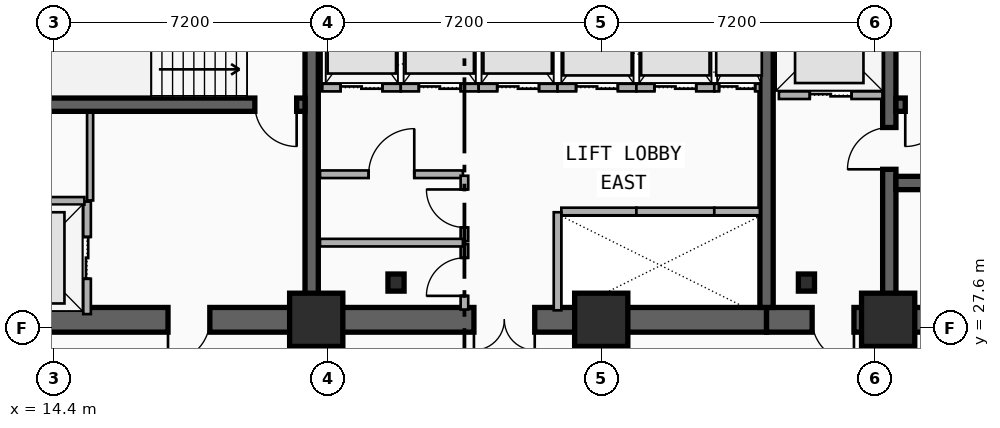
"""IFC4 building model, lengths in metres.
Left out: names, types, materials, properties, quantities, classifications, styles, units other than length and angle.
Written with IfcOpenShell. Run it as: python <this file> out.ifc"""

import sys

from ifc_helpers import new_model, si_unit, direction, frame, frame_2d, origin, origin_2d, place, context, subcontext, project, spatial, rectangle, i_section, extrude, element, fill, save


model = new_model("IFC4")
c1 = context("Model", 3, precision=1e-05, world=origin(), true_north=direction((0.0, 1.0)))
c2 = subcontext(c1, "Body", "Model", "MODEL_VIEW")
j1 = project(units=[si_unit("LENGTHUNIT", "METRE"), si_unit("PLANEANGLEUNIT", "RADIAN")], contexts=[c1])
p1 = place(None, origin())
s1 = spatial("IfcSite", under=j1, at=p1, CompositionType="ELEMENT")
p2 = place(p1, origin())
s2 = spatial("IfcBuilding", under=s1, at=p2, CompositionType="ELEMENT")
p3 = place(p2, frame((0.0, 0.0, 82.8)))
s3 = spatial("IfcBuildingStorey", under=s2, at=p3, CompositionType="ELEMENT", Elevation=82.8)
p4 = place(p3, frame((21.18, 27.82, 0.0), z_axis=(0.0, 0.0, 1.0), x_axis=(-1.0, 0.0, 0.0)))
e1 = element("IfcWall", 1, at=p4, inside=s3, PredefinedType="SHEAR", context=c2, shape_type="SweptSolid", body=[
    extrude(rectangle(XDim=9.03, YDim=0.65, at=frame_2d((4.515, 0.0))), origin(), (0.0, 0.0, 1.0), 3.5),
])
p5 = place(p4, frame((2.68, 0.0, 0.0)))
e2 = element("IfcOpeningElement", 2, at=p5, cuts=e1, PredefinedType="OPENING", context=c2, shape_type="SweptSolid", body=[
    extrude(rectangle(XDim=1.1, YDim=2.15, at=frame_2d((0.55, 1.075))), frame((0.0, 0.335, 0.0), z_axis=(0.0, -1.0, 0.0), x_axis=(1.0, 0.0, 0.0)), (0.0, 0.0, 1.0), 0.67),
])
p6 = place(p3, frame((33.15, 27.82, 0.0), z_axis=(0.0, 0.0, 1.0), x_axis=(-1.0, 0.0, 0.0)))
e3 = element("IfcWall", 3, at=p6, inside=s3, PredefinedType="SHEAR", context=c2, shape_type="SweptSolid", body=[
    extrude(rectangle(XDim=11.97, YDim=0.65, at=frame_2d((5.985, 0.0))), origin(), (0.0, 0.0, 1.0), 3.5),
])
p7 = place(p6, frame((6.1, 0.0, 0.0)))
e4 = element("IfcOpeningElement", 4, at=p7, cuts=e3, PredefinedType="OPENING", context=c2, shape_type="SweptSolid", body=[
    extrude(rectangle(XDim=1.6, YDim=2.2, at=frame_2d((0.8, 1.1))), frame((0.0, 0.335, 0.0), z_axis=(0.0, -1.0, 0.0), x_axis=(1.0, 0.0, 0.0)), (0.0, 0.0, 1.0), 0.67),
])
p8 = place(p3, frame((45.38, 27.82, 0.0), z_axis=(0.0, 0.0, 1.0), x_axis=(-1.0, 0.0, 0.0)))
e5 = element("IfcWall", 5, at=p8, inside=s3, PredefinedType="SHEAR", context=c2, shape_type="SweptSolid", body=[
    extrude(rectangle(XDim=12.23, YDim=0.65, at=frame_2d((6.115, 0.0))), origin(), (0.0, 0.0, 1.0), 3.5),
])
p9 = place(p8, frame((9.93, 0.0, 0.0)))
e6 = element("IfcOpeningElement", 6, at=p9, cuts=e5, PredefinedType="OPENING", context=c2, shape_type="SweptSolid", body=[
    extrude(rectangle(XDim=1.1, YDim=2.15, at=frame_2d((0.55, 1.075))), frame((0.0, 0.335, 0.0), z_axis=(0.0, -1.0, 0.0), x_axis=(1.0, 0.0, 0.0)), (0.0, 0.0, 1.0), 0.67),
])
p10 = place(p8, frame((6.23, 0.0, 0.0)))
e7 = element("IfcOpeningElement", 7, at=p10, cuts=e5, PredefinedType="OPENING", context=c2, shape_type="SweptSolid", body=[
    extrude(rectangle(XDim=1.1, YDim=2.15, at=frame_2d((0.55, 1.075))), frame((0.0, 0.335, 0.0), z_axis=(0.0, -1.0, 0.0), x_axis=(1.0, 0.0, 0.0)), (0.0, 0.0, 1.0), 0.67),
])
for number, where, z_axis, x_axis in (
    (8, (21.18, 28.145, 0.0), (0.0, 0.0, 1.0), (0.0, 1.0, 0.0)),
    (9, (33.15, 28.145, 0.0), (0.0, 0.0, 1.0), (0.0, 1.0, 0.0)),
):
    element("IfcWall", number, at=place(p3, frame(where, z_axis=z_axis, x_axis=x_axis)), inside=s3, PredefinedType="SHEAR", context=c2, shape_type="SweptSolid", body=[
        extrude(rectangle(XDim=8.58, YDim=0.35, at=frame_2d((4.29, 0.0))), origin(), (0.0, 0.0, 1.0), 3.5),
    ])
p11 = place(p3, frame((36.38, 28.145, 0.0), z_axis=(0.0, 0.0, 1.0), x_axis=(0.0, 1.0, 0.0)))
e10 = element("IfcWall", 10, at=p11, inside=s3, PredefinedType="SHEAR", context=c2, shape_type="SweptSolid", body=[
    extrude(rectangle(XDim=8.58, YDim=0.35, at=frame_2d((4.29, 0.0))), origin(), (0.0, 0.0, 1.0), 3.5),
])
p12 = place(p11, frame((3.635, 0.0, 0.0)))
e11 = element("IfcOpeningElement", 11, at=p12, cuts=e10, PredefinedType="OPENING", context=c2, shape_type="SweptSolid", body=[
    extrude(rectangle(XDim=1.1, YDim=2.15, at=frame_2d((0.55, 1.075))), frame((0.0, 0.185, 0.0), z_axis=(0.0, -1.0, 0.0), x_axis=(1.0, 0.0, 0.0)), (0.0, 0.0, 1.0), 0.37),
])
p13 = place(p3, frame((21.005, 33.48, 0.0), z_axis=(0.0, 0.0, 1.0), x_axis=(-1.0, 0.0, 0.0)))
e12 = element("IfcWall", 12, at=p13, inside=s3, PredefinedType="SHEAR", context=c2, shape_type="SweptSolid", body=[
    extrude(rectangle(XDim=8.53, YDim=0.35, at=frame_2d((4.265, 0.0))), origin(), (0.0, 0.0, 1.0), 3.5),
])
p14 = place(p13, frame((0.22, 0.0, 0.0)))
e13 = element("IfcOpeningElement", 13, at=p14, cuts=e12, PredefinedType="OPENING", context=c2, shape_type="SweptSolid", body=[
    extrude(rectangle(XDim=1.1, YDim=2.15, at=frame_2d((0.55, 1.075))), frame((0.0, 0.185, 0.0), z_axis=(0.0, -1.0, 0.0), x_axis=(1.0, 0.0, 0.0)), (0.0, 0.0, 1.0), 0.37),
])
p15 = place(p3, frame((45.055, 33.48, 0.0), z_axis=(0.0, 0.0, 1.0), x_axis=(-1.0, 0.0, 0.0)))
e14 = element("IfcWall", 14, at=p15, inside=s3, PredefinedType="SHEAR", context=c2, shape_type="SweptSolid", body=[
    extrude(rectangle(XDim=8.5, YDim=0.35, at=frame_2d((4.25, 0.0))), origin(), (0.0, 0.0, 1.0), 3.5),
])
p16 = place(p15, frame((7.155, 0.0, 0.0)))
e15 = element("IfcOpeningElement", 15, at=p16, cuts=e14, PredefinedType="OPENING", context=c2, shape_type="SweptSolid", body=[
    extrude(rectangle(XDim=1.1, YDim=2.15, at=frame_2d((0.55, 1.075))), frame((0.0, 0.185, 0.0), z_axis=(0.0, -1.0, 0.0), x_axis=(1.0, 0.0, 0.0)), (0.0, 0.0, 1.0), 0.37),
])
p17 = place(p3, frame((36.555, 31.42, 0.0), z_axis=(0.0, 0.0, 1.0), x_axis=(1.0, 0.0, 0.0)))
e16 = element("IfcWall", 16, at=p17, inside=s3, PredefinedType="SHEAR", context=c2, shape_type="SweptSolid", body=[
    extrude(rectangle(XDim=8.5, YDim=0.35, at=frame_2d((4.25, 0.0))), origin(), (0.0, 0.0, 1.0), 3.5),
])
for number, where, z_axis, x_axis in (
    (17, (23.4, 28.8, 0.0), (0.0, 0.0, 1.0), (1.0, 0.0, 0.0)),
    (18, (34.2, 28.8, 0.0), (0.0, 0.0, 1.0), (1.0, 0.0, 0.0)),
):
    element("IfcColumn", number, at=place(p3, frame(where, z_axis=z_axis, x_axis=x_axis)), inside=s3, PredefinedType="COLUMN", context=c2, shape_type="SweptSolid", body=[
        extrude(i_section(OverallWidth=0.424, OverallDepth=0.45, WebThickness=0.041, FlangeThickness=0.065, FilletRadius=0.015, at=origin_2d()), origin(), (0.0, 0.0, 1.0), 3.5),
    ])
for number, where, z_axis, x_axis in (
    (19, (21.3, 27.82, 0.0), (0.0, 0.0, 1.0), (1.0, 0.0, 0.0)),
    (20, (28.8, 27.82, 0.0), (0.0, 0.0, 1.0), (1.0, 0.0, 0.0)),
    (21, (36.35, 27.82, 0.0), (0.0, 0.0, 1.0), (1.0, 0.0, 0.0)),
):
    element("IfcColumn", number, at=place(p3, frame(where, z_axis=z_axis, x_axis=x_axis)), inside=s3, PredefinedType="COLUMN", context=c2, shape_type="SweptSolid", body=[
        extrude(rectangle(XDim=1.4, YDim=1.4, at=origin_2d()), origin(), (0.0, 0.0, 1.0), 3.5),
    ])
p18 = place(p3, frame((15.27, 27.97, 0.0), z_axis=(0.0, 0.0, 1.0), x_axis=(0.0, 1.0, 0.0)))
e22 = element("IfcWall", 22, at=p18, inside=s3, PredefinedType="PARTITIONING", context=c2, shape_type="SweptSolid", body=[
    extrude(rectangle(XDim=2.96, YDim=0.2, at=frame_2d((1.48, 0.0))), origin(), (0.0, 0.0, 1.0), 2.212),
])
p19 = place(p18, frame((0.93, 0.0, 0.0)))
e23 = element("IfcOpeningElement", 23, at=p19, cuts=e22, PredefinedType="OPENING", context=c2, shape_type="SweptSolid", body=[
    extrude(rectangle(XDim=1.1, YDim=2.15, at=frame_2d((0.55, 1.075))), frame((0.0, 0.11, 0.0), z_axis=(0.0, -1.0, 0.0), x_axis=(1.0, 0.0, 0.0)), (0.0, 0.0, 1.0), 0.22),
])
p20 = place(p3, frame((12.45, 30.95, 0.0), z_axis=(0.0, 0.0, 1.0), x_axis=(1.0, 0.0, 0.0)))
e24 = element("IfcWall", 24, at=p20, inside=s3, PredefinedType="PARTITIONING", context=c2, shape_type="SweptSolid", body=[
    extrude(rectangle(XDim=2.75, YDim=0.2, at=frame_2d((1.375, 0.0))), origin(), (0.0, 0.0, 1.0), 2.212),
])
p21 = place(p3, frame((33.475, 33.73, 0.0), z_axis=(0.0, 0.0, 1.0), x_axis=(1.0, 0.0, 0.0)))
e25 = element("IfcWall", 25, at=p21, inside=s3, PredefinedType="PARTITIONING", context=c2, shape_type="SweptSolid", body=[
    extrude(rectangle(XDim=2.725, YDim=0.2, at=frame_2d((1.362, 0.0))), origin(), (0.0, 0.0, 1.0), 2.212),
])
p22 = place(p21, frame((0.812, 0.0, 0.0)))
e26 = element("IfcOpeningElement", 26, at=p22, cuts=e25, PredefinedType="OPENING", context=c2, shape_type="SweptSolid", body=[
    extrude(rectangle(XDim=1.1, YDim=2.15, at=frame_2d((0.55, 1.075))), frame((0.0, 0.11, 0.0), z_axis=(0.0, -1.0, 0.0), x_axis=(1.0, 0.0, 0.0)), (0.0, 0.0, 1.0), 0.22),
])
p23 = place(p3, frame((27.75, 30.67, 0.0), z_axis=(0.0, 0.0, 1.0), x_axis=(1.0, 0.0, 0.0)))
e27 = element("IfcWall", 27, at=p23, inside=s3, PredefinedType="PARTITIONING", context=c2, shape_type="SweptSolid", body=[
    extrude(rectangle(XDim=1.975, YDim=0.2, at=frame_2d((0.988, 0.0))), origin(), (0.0, 0.0, 1.0), 2.212),
])
p24 = place(p3, frame((27.65, 28.07, 0.0), z_axis=(0.0, 0.0, 1.0), x_axis=(0.0, 1.0, 0.0)))
e28 = element("IfcWall", 28, at=p24, inside=s3, PredefinedType="PARTITIONING", context=c2, shape_type="SweptSolid", body=[
    extrude(rectangle(XDim=2.58, YDim=0.2, at=frame_2d((1.29, 0.0))), origin(), (0.0, 0.0, 1.0), 2.212),
])
p25 = place(p3, frame((29.725, 30.67, 0.0), z_axis=(0.0, 0.0, 1.0), x_axis=(1.0, 0.0, 0.0)))
e29 = element("IfcWall", 29, at=p25, inside=s3, PredefinedType="PARTITIONING", context=c2, shape_type="SweptSolid", body=[
    extrude(rectangle(XDim=2.05, YDim=0.2, at=frame_2d((1.025, 0.0))), origin(), (0.0, 0.0, 1.0), 2.62),
])
p26 = place(p3, frame((31.775, 30.67, 0.0), z_axis=(0.0, 0.0, 1.0), x_axis=(1.0, 0.0, 0.0)))
e30 = element("IfcWall", 30, at=p26, inside=s3, PredefinedType="PARTITIONING", context=c2, shape_type="SweptSolid", body=[
    extrude(rectangle(XDim=1.2, YDim=0.2, at=frame_2d((0.6, 0.0))), origin(), (0.0, 0.0, 1.0), 2.62),
])
p27 = place(p3, frame((21.46, 33.93, 0.0), z_axis=(0.0, 0.0, 1.0), x_axis=(1.0, 0.0, 0.0)))
e31 = element("IfcWall", 31, at=p27, inside=s3, PredefinedType="PARTITIONING", context=c2, shape_type="SweptSolid", body=[
    extrude(rectangle(XDim=2.065, YDim=0.2, at=frame_2d((1.032, 0.0))), origin(), (0.0, 0.0, 1.0), 2.212),
])
p28 = place(p27, frame((0.482, 0.0, 0.0)))
e32 = element("IfcOpeningElement", 32, at=p28, cuts=e31, PredefinedType="OPENING", context=c2, shape_type="SweptSolid", body=[
    extrude(rectangle(XDim=1.1, YDim=2.15, at=frame_2d((0.55, 1.075))), frame((0.0, 0.11, 0.0), z_axis=(0.0, -1.0, 0.0), x_axis=(1.0, 0.0, 0.0)), (0.0, 0.0, 1.0), 0.22),
])
p29 = place(p3, frame((23.525, 33.93, 0.0), z_axis=(0.0, 0.0, 1.0), x_axis=(1.0, 0.0, 0.0)))
e33 = element("IfcWall", 33, at=p29, inside=s3, PredefinedType="PARTITIONING", context=c2, shape_type="SweptSolid", body=[
    extrude(rectangle(XDim=2.05, YDim=0.2, at=frame_2d((1.025, 0.0))), origin(), (0.0, 0.0, 1.0), 3.24),
])
p30 = place(p29, frame((0.475, 0.0, 0.0)))
e34 = element("IfcOpeningElement", 34, at=p30, cuts=e33, PredefinedType="OPENING", context=c2, shape_type="SweptSolid", body=[
    extrude(rectangle(XDim=1.1, YDim=2.15, at=frame_2d((0.55, 1.075))), frame((0.0, 0.11, 0.0), z_axis=(0.0, -1.0, 0.0), x_axis=(1.0, 0.0, 0.0)), (0.0, 0.0, 1.0), 0.22),
])
p31 = place(p3, frame((25.575, 33.93, 0.0), z_axis=(0.0, 0.0, 1.0), x_axis=(1.0, 0.0, 0.0)))
e35 = element("IfcWall", 35, at=p31, inside=s3, PredefinedType="PARTITIONING", context=c2, shape_type="SweptSolid", body=[
    extrude(rectangle(XDim=2.075, YDim=0.2, at=frame_2d((1.038, 0.0))), origin(), (0.0, 0.0, 1.0), 3.24),
])
p32 = place(p31, frame((0.488, 0.0, 0.0)))
e36 = element("IfcOpeningElement", 36, at=p32, cuts=e35, PredefinedType="OPENING", context=c2, shape_type="SweptSolid", body=[
    extrude(rectangle(XDim=1.1, YDim=2.15, at=frame_2d((0.55, 1.075))), frame((0.0, 0.11, 0.0), z_axis=(0.0, -1.0, 0.0), x_axis=(1.0, 0.0, 0.0)), (0.0, 0.0, 1.0), 0.22),
])
p33 = place(p3, frame((27.65, 33.93, 0.0), z_axis=(0.0, 0.0, 1.0), x_axis=(1.0, 0.0, 0.0)))
e37 = element("IfcWall", 37, at=p33, inside=s3, PredefinedType="PARTITIONING", context=c2, shape_type="SweptSolid", body=[
    extrude(rectangle(XDim=2.075, YDim=0.2, at=frame_2d((1.038, 0.0))), origin(), (0.0, 0.0, 1.0), 2.212),
])
p34 = place(p33, frame((0.488, 0.0, 0.0)))
e38 = element("IfcOpeningElement", 38, at=p34, cuts=e37, PredefinedType="OPENING", context=c2, shape_type="SweptSolid", body=[
    extrude(rectangle(XDim=1.1, YDim=2.15, at=frame_2d((0.55, 1.075))), frame((0.0, 0.11, 0.0), z_axis=(0.0, -1.0, 0.0), x_axis=(1.0, 0.0, 0.0)), (0.0, 0.0, 1.0), 0.22),
])
p35 = place(p3, frame((29.725, 33.93, 0.0), z_axis=(0.0, 0.0, 1.0), x_axis=(1.0, 0.0, 0.0)))
e39 = element("IfcWall", 39, at=p35, inside=s3, PredefinedType="PARTITIONING", context=c2, shape_type="SweptSolid", body=[
    extrude(rectangle(XDim=2.05, YDim=0.2, at=frame_2d((1.025, 0.0))), origin(), (0.0, 0.0, 1.0), 3.24),
])
p36 = place(p35, frame((0.475, 0.0, 0.0)))
e40 = element("IfcOpeningElement", 40, at=p36, cuts=e39, PredefinedType="OPENING", context=c2, shape_type="SweptSolid", body=[
    extrude(rectangle(XDim=1.1, YDim=2.15, at=frame_2d((0.55, 1.075))), frame((0.0, 0.11, 0.0), z_axis=(0.0, -1.0, 0.0), x_axis=(1.0, 0.0, 0.0)), (0.0, 0.0, 1.0), 0.22),
])
p37 = place(p3, frame((31.775, 33.93, 0.0), z_axis=(0.0, 0.0, 1.0), x_axis=(1.0, 0.0, 0.0)))
e41 = element("IfcWall", 41, at=p37, inside=s3, PredefinedType="PARTITIONING", context=c2, shape_type="SweptSolid", body=[
    extrude(rectangle(XDim=1.2, YDim=0.2, at=frame_2d((0.6, 0.0))), origin(), (0.0, 0.0, 1.0), 3.24),
])
p38 = place(p37, frame((0.125, 0.0, 0.0)))
e42 = element("IfcOpeningElement", 42, at=p38, cuts=e41, PredefinedType="OPENING", context=c2, shape_type="SweptSolid", body=[
    extrude(rectangle(XDim=0.95, YDim=2.15, at=frame_2d((0.475, 1.075))), frame((0.0, 0.11, 0.0), z_axis=(0.0, -1.0, 0.0), x_axis=(1.0, 0.0, 0.0)), (0.0, 0.0, 1.0), 0.22),
])
p39 = place(p3, frame((21.4, 31.65, 0.0), z_axis=(0.0, 0.0, 1.0), x_axis=(1.0, 0.0, 0.0)))
e43 = element("IfcWall", 43, at=p39, inside=s3, PredefinedType="PARTITIONING", context=c2, shape_type="SweptSolid", body=[
    extrude(rectangle(XDim=3.76, YDim=0.2, at=frame_2d((1.88, 0.0))), origin(), (0.0, 0.0, 1.0), 2.28),
])
p40 = place(p39, frame((1.28, 0.0, 0.0)))
e44 = element("IfcOpeningElement", 44, at=p40, cuts=e43, PredefinedType="OPENING", context=c2, shape_type="SweptSolid", body=[
    extrude(rectangle(XDim=1.2, YDim=2.15, at=frame_2d((0.6, 1.075))), frame((0.0, 0.11, 0.0), z_axis=(0.0, -1.0, 0.0), x_axis=(1.0, 0.0, 0.0)), (0.0, 0.0, 1.0), 0.22),
])
p41 = place(p3, frame((25.2, 28.09, 0.0), z_axis=(0.0, 0.0, 1.0), x_axis=(0.0, 1.0, 0.0)))
e45 = element("IfcWall", 45, at=p41, inside=s3, PredefinedType="PARTITIONING", context=c2, shape_type="SweptSolid", body=[
    extrude(rectangle(XDim=1.72, YDim=0.2, at=frame_2d((0.86, 0.0))), origin(), (0.0, 0.0, 1.0), 2.62),
])
p42 = place(p41, frame((0.36, 0.0, 0.0)))
e46 = element("IfcOpeningElement", 46, at=p42, cuts=e45, PredefinedType="OPENING", context=c2, shape_type="SweptSolid", body=[
    extrude(rectangle(XDim=1.0, YDim=2.15, at=frame_2d((0.5, 1.075))), frame((0.0, 0.11, 0.0), z_axis=(0.0, -1.0, 0.0), x_axis=(1.0, 0.0, 0.0)), (0.0, 0.0, 1.0), 0.22),
])
p43 = place(p3, frame((25.2, 29.89, 0.0), z_axis=(0.0, 0.0, 1.0), x_axis=(0.0, 1.0, 0.0)))
e47 = element("IfcWall", 47, at=p43, inside=s3, PredefinedType="PARTITIONING", context=c2, shape_type="SweptSolid", body=[
    extrude(rectangle(XDim=1.72, YDim=0.2, at=frame_2d((0.86, 0.0))), origin(), (0.0, 0.0, 1.0), 3.24),
])
p44 = place(p43, frame((0.36, 0.0, 0.0)))
e48 = element("IfcOpeningElement", 48, at=p44, cuts=e47, PredefinedType="OPENING", context=c2, shape_type="SweptSolid", body=[
    extrude(rectangle(XDim=1.0, YDim=2.15, at=frame_2d((0.5, 1.075))), frame((0.0, 0.11, 0.0), z_axis=(0.0, -1.0, 0.0), x_axis=(1.0, 0.0, 0.0)), (0.0, 0.0, 1.0), 0.22),
])
p45 = place(p3, frame((21.4, 29.85, 0.0), z_axis=(0.0, 0.0, 1.0), x_axis=(1.0, 0.0, 0.0)))
e49 = element("IfcWall", 49, at=p45, inside=s3, PredefinedType="PARTITIONING", context=c2, shape_type="SweptSolid", body=[
    extrude(rectangle(XDim=3.76, YDim=0.2, at=frame_2d((1.88, 0.0))), origin(), (0.0, 0.0, 1.0), 2.28),
])
p46 = place(p3, frame((15.35, 30.96, 0.0), z_axis=(0.0, 0.0, 1.0), x_axis=(0.0, 1.0, 0.0)))
e50 = element("IfcWall", 50, at=p46, inside=s3, PredefinedType="PARTITIONING", context=c2, shape_type="SweptSolid", body=[
    extrude(rectangle(XDim=2.31, YDim=0.16, at=frame_2d((1.155, 0.0))), origin(), (0.0, 0.0, 1.0), 3.24),
])
p47 = place(p19, origin())
e51 = element("IfcDoor", 51, at=p47, inside=s3, OperationType="DOUBLE_DOOR_SLIDING", PredefinedType="DOOR", context=c2, shape_type="SweptSolid", body=[
    extrude(rectangle(XDim=1.1, YDim=2.15, at=frame_2d((0.55, 1.075))), frame((0.0, 0.025, 0.0), z_axis=(0.0, -1.0, 0.0), x_axis=(1.0, 0.0, 0.0)), (0.0, 0.0, 1.0), 0.05),
])
fill(e23, e51)
p48 = place(p22, origin())
e52 = element("IfcDoor", 52, at=p48, inside=s3, OperationType="DOUBLE_DOOR_SLIDING", PredefinedType="DOOR", context=c2, shape_type="SweptSolid", body=[
    extrude(rectangle(XDim=1.1, YDim=2.15, at=frame_2d((0.55, 1.075))), frame((0.0, 0.025, 0.0), z_axis=(0.0, -1.0, 0.0), x_axis=(1.0, 0.0, 0.0)), (0.0, 0.0, 1.0), 0.05),
])
fill(e26, e52)
p49 = place(p28, origin())
e53 = element("IfcDoor", 53, at=p49, inside=s3, OperationType="DOUBLE_DOOR_SLIDING", PredefinedType="DOOR", context=c2, shape_type="SweptSolid", body=[
    extrude(rectangle(XDim=1.1, YDim=2.15, at=frame_2d((0.55, 1.075))), frame((0.0, 0.025, 0.0), z_axis=(0.0, -1.0, 0.0), x_axis=(1.0, 0.0, 0.0)), (0.0, 0.0, 1.0), 0.05),
])
fill(e32, e53)
p50 = place(p30, origin())
e54 = element("IfcDoor", 54, at=p50, inside=s3, OperationType="DOUBLE_DOOR_SLIDING", PredefinedType="DOOR", context=c2, shape_type="SweptSolid", body=[
    extrude(rectangle(XDim=1.1, YDim=2.15, at=frame_2d((0.55, 1.075))), frame((0.0, 0.025, 0.0), z_axis=(0.0, -1.0, 0.0), x_axis=(1.0, 0.0, 0.0)), (0.0, 0.0, 1.0), 0.05),
])
fill(e34, e54)
p51 = place(p32, origin())
e55 = element("IfcDoor", 55, at=p51, inside=s3, OperationType="DOUBLE_DOOR_SLIDING", PredefinedType="DOOR", context=c2, shape_type="SweptSolid", body=[
    extrude(rectangle(XDim=1.1, YDim=2.15, at=frame_2d((0.55, 1.075))), frame((0.0, 0.025, 0.0), z_axis=(0.0, -1.0, 0.0), x_axis=(1.0, 0.0, 0.0)), (0.0, 0.0, 1.0), 0.05),
])
fill(e36, e55)
p52 = place(p34, origin())
e56 = element("IfcDoor", 56, at=p52, inside=s3, OperationType="DOUBLE_DOOR_SLIDING", PredefinedType="DOOR", context=c2, shape_type="SweptSolid", body=[
    extrude(rectangle(XDim=1.1, YDim=2.15, at=frame_2d((0.55, 1.075))), frame((0.0, 0.025, 0.0), z_axis=(0.0, -1.0, 0.0), x_axis=(1.0, 0.0, 0.0)), (0.0, 0.0, 1.0), 0.05),
])
fill(e38, e56)
p53 = place(p36, origin())
e57 = element("IfcDoor", 57, at=p53, inside=s3, OperationType="DOUBLE_DOOR_SLIDING", PredefinedType="DOOR", context=c2, shape_type="SweptSolid", body=[
    extrude(rectangle(XDim=1.1, YDim=2.15, at=frame_2d((0.55, 1.075))), frame((0.0, 0.025, 0.0), z_axis=(0.0, -1.0, 0.0), x_axis=(1.0, 0.0, 0.0)), (0.0, 0.0, 1.0), 0.05),
])
fill(e40, e57)
p54 = place(p38, origin())
e58 = element("IfcDoor", 58, at=p54, inside=s3, OperationType="DOUBLE_DOOR_SLIDING", PredefinedType="DOOR", context=c2, shape_type="SweptSolid", body=[
    extrude(rectangle(XDim=0.95, YDim=2.15, at=frame_2d((0.475, 1.075))), frame((0.0, 0.025, 0.0), z_axis=(0.0, -1.0, 0.0), x_axis=(1.0, 0.0, 0.0)), (0.0, 0.0, 1.0), 0.05),
])
fill(e42, e58)
p55 = place(p14, origin())
e59 = element("IfcDoor", 59, at=p55, inside=s3, OperationType="SINGLE_SWING_LEFT", PredefinedType="DOOR", context=c2, shape_type="SweptSolid", body=[
    extrude(rectangle(XDim=1.1, YDim=2.15, at=frame_2d((0.55, 1.075))), frame((0.0, 0.025, 0.0), z_axis=(0.0, -1.0, 0.0), x_axis=(1.0, 0.0, 0.0)), (0.0, 0.0, 1.0), 0.05),
])
fill(e13, e59)
p56 = place(p5, origin())
e60 = element("IfcDoor", 60, at=p56, inside=s3, OperationType="SINGLE_SWING_RIGHT", PredefinedType="DOOR", context=c2, shape_type="SweptSolid", body=[
    extrude(rectangle(XDim=1.1, YDim=2.15, at=frame_2d((0.55, 1.075))), frame((0.0, 0.025, 0.0), z_axis=(0.0, -1.0, 0.0), x_axis=(1.0, 0.0, 0.0)), (0.0, 0.0, 1.0), 0.05),
])
fill(e2, e60)
p57 = place(p16, origin())
e61 = element("IfcDoor", 61, at=p57, inside=s3, OperationType="SINGLE_SWING_RIGHT", PredefinedType="DOOR", context=c2, shape_type="SweptSolid", body=[
    extrude(rectangle(XDim=1.1, YDim=2.15, at=frame_2d((0.55, 1.075))), frame((0.0, 0.025, 0.0), z_axis=(0.0, -1.0, 0.0), x_axis=(1.0, 0.0, 0.0)), (0.0, 0.0, 1.0), 0.05),
])
fill(e15, e61)
p58 = place(p12, origin())
e62 = element("IfcDoor", 62, at=p58, inside=s3, OperationType="SINGLE_SWING_LEFT", PredefinedType="DOOR", context=c2, shape_type="SweptSolid", body=[
    extrude(rectangle(XDim=1.1, YDim=2.15, at=frame_2d((0.55, 1.075))), frame((0.0, 0.025, 0.0), z_axis=(0.0, -1.0, 0.0), x_axis=(1.0, 0.0, 0.0)), (0.0, 0.0, 1.0), 0.05),
])
fill(e11, e62)
p59 = place(p9, origin())
e63 = element("IfcDoor", 63, at=p59, inside=s3, OperationType="SINGLE_SWING_LEFT", PredefinedType="DOOR", context=c2, shape_type="SweptSolid", body=[
    extrude(rectangle(XDim=1.1, YDim=2.15, at=frame_2d((0.55, 1.075))), frame((0.0, 0.025, 0.0), z_axis=(0.0, -1.0, 0.0), x_axis=(1.0, 0.0, 0.0)), (0.0, 0.0, 1.0), 0.05),
])
fill(e6, e63)
p60 = place(p7, origin())
e64 = element("IfcDoor", 64, at=p60, inside=s3, OperationType="SINGLE_SWING_LEFT", PredefinedType="DOOR", context=c2, shape_type="SweptSolid", body=[
    extrude(rectangle(XDim=1.6, YDim=2.2, at=frame_2d((0.8, 1.1))), frame((0.0, 0.025, 0.0), z_axis=(0.0, -1.0, 0.0), x_axis=(1.0, 0.0, 0.0)), (0.0, 0.0, 1.0), 0.05),
])
fill(e4, e64)
p61 = place(p40, origin())
e65 = element("IfcDoor", 65, at=p61, inside=s3, OperationType="SINGLE_SWING_RIGHT", PredefinedType="DOOR", context=c2, shape_type="SweptSolid", body=[
    extrude(rectangle(XDim=1.2, YDim=2.15, at=frame_2d((0.6, 1.075))), frame((0.0, 0.025, 0.0), z_axis=(0.0, -1.0, 0.0), x_axis=(1.0, 0.0, 0.0)), (0.0, 0.0, 1.0), 0.05),
])
fill(e44, e65)
p62 = place(p42, origin())
e66 = element("IfcDoor", 66, at=p62, inside=s3, OperationType="SINGLE_SWING_LEFT", PredefinedType="DOOR", context=c2, shape_type="SweptSolid", body=[
    extrude(rectangle(XDim=1.0, YDim=2.15, at=frame_2d((0.5, 1.075))), frame((0.0, 0.025, 0.0), z_axis=(0.0, -1.0, 0.0), x_axis=(1.0, 0.0, 0.0)), (0.0, 0.0, 1.0), 0.05),
])
fill(e46, e66)
p63 = place(p44, origin())
e67 = element("IfcDoor", 67, at=p63, inside=s3, OperationType="SINGLE_SWING_RIGHT", PredefinedType="DOOR", context=c2, shape_type="SweptSolid", body=[
    extrude(rectangle(XDim=1.0, YDim=2.15, at=frame_2d((0.5, 1.075))), frame((0.0, 0.025, 0.0), z_axis=(0.0, -1.0, 0.0), x_axis=(1.0, 0.0, 0.0)), (0.0, 0.0, 1.0), 0.05),
])
fill(e48, e67)
save(model, sys.argv[1])
